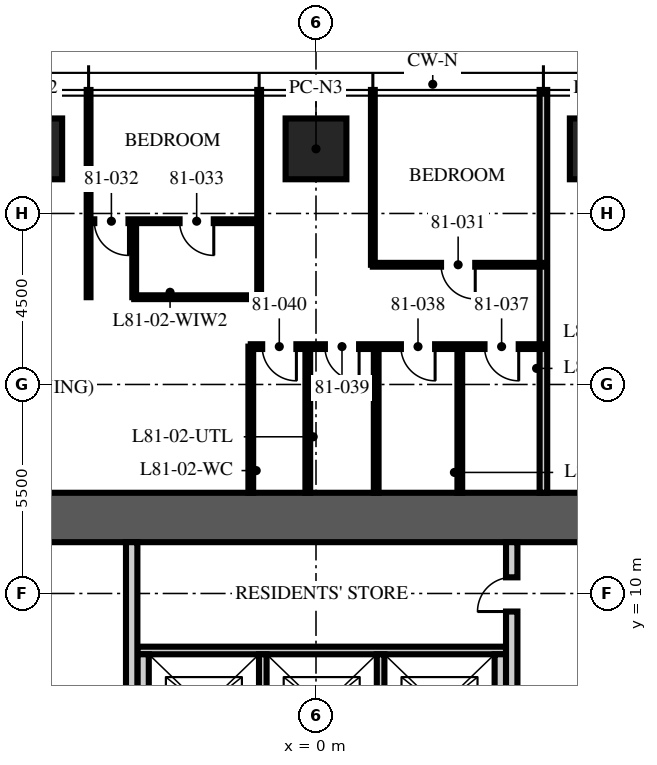
"""IFC4 building model, lengths in metres.
Left out: names, types, materials, properties, quantities, classifications, styles, units other than length and angle.
Written with IfcOpenShell. Run it as: python <this file> out.ifc"""

import sys

from ifc_helpers import new_model, si_unit, direction, frame, frame_2d, origin, origin_2d, place, context, subcontext, project, spatial, rectangle, extrude, element, fill, save


model = new_model("IFC4")
c1 = context("Model", 3, precision=1e-05, world=origin(), true_north=direction((0.0, 1.0)))
c2 = subcontext(c1, "Body", "Model", "MODEL_VIEW")
j1 = project(units=[si_unit("LENGTHUNIT", "METRE"), si_unit("PLANEANGLEUNIT", "RADIAN")], contexts=[c1])
p1 = place(None, origin())
s1 = spatial("IfcSite", under=j1, at=p1, CompositionType="ELEMENT")
p2 = place(p1, origin())
s2 = spatial("IfcBuilding", under=s1, at=p2, CompositionType="ELEMENT")
p3 = place(p2, frame((0.0, 0.0, 323.25)))
s3 = spatial("IfcBuildingStorey", under=s2, at=p3, CompositionType="ELEMENT", Elevation=323.25)
p4 = place(p3, frame((-15.5, 12.0, -0.25), z_axis=(0.0, 0.0, 1.0), x_axis=(1.0, 0.0, 0.0)))
e1 = element("IfcWall", 1, at=p4, inside=s3, PredefinedType="SHEAR", context=c2, shape_type="SweptSolid", body=[
    extrude(rectangle(XDim=31.0, YDim=1.3, at=frame_2d((15.5, 0.0))), origin(), (0.0, 0.0, 1.0), 3.75),
])
for number, where, z_axis, x_axis in (
    (2, (-7.48, 21.7, 0.0), (0.0, 0.0, 1.0), (1.0, 0.0, 0.0)),
    (3, (0.0, 21.7, 0.0), (0.0, 0.0, 1.0), (1.0, 0.0, 0.0)),
    (4, (7.48, 21.7, 0.0), (0.0, 0.0, 1.0), (1.0, 0.0, 0.0)),
):
    element("IfcColumn", number, at=place(p3, frame(where, z_axis=z_axis, x_axis=x_axis)), inside=s3, PredefinedType="COLUMN", context=c2, shape_type="SweptSolid", body=[
        extrude(rectangle(XDim=1.6, YDim=1.6, at=origin_2d()), origin(), (0.0, 0.0, 1.0), 3.75),
    ])
p5 = place(p3, frame((-4.7, 8.5, 0.0), z_axis=(0.0, 0.0, 1.0), x_axis=(1.0, 0.0, 0.0)))
e5 = element("IfcWall", 5, at=p5, inside=s3, PredefinedType="PARTITIONING", context=c2, shape_type="SweptSolid", body=[
    extrude(rectangle(XDim=9.7, YDim=0.2, at=frame_2d((4.85, 0.0))), origin(), (0.0, 0.0, 1.0), 3.5),
])
for number, where, z_axis, x_axis in (
    (6, (-4.55, 5.6, 0.0), (0.0, 0.0, 1.0), (0.0, 1.0, 0.0)),
    (7, (4.85, 5.6, 0.0), (0.0, 0.0, 1.0), (0.0, 1.0, 0.0)),
):
    element("IfcWall", number, at=place(p3, frame(where, z_axis=z_axis, x_axis=x_axis)), inside=s3, PredefinedType="PARTITIONING", context=c2, shape_type="SweptSolid", body=[
        extrude(rectangle(XDim=2.8, YDim=0.3, at=frame_2d((1.4, 0.0))), origin(), (0.0, 0.0, 1.0), 3.5),
    ])
for number, where, z_axis, x_axis in (
    (8, (-1.4, 5.6, 0.0), (0.0, 0.0, 1.0), (0.0, 1.0, 0.0)),
    (9, (1.7, 5.6, 0.0), (0.0, 0.0, 1.0), (0.0, 1.0, 0.0)),
):
    element("IfcWall", number, at=place(p3, frame(where, z_axis=z_axis, x_axis=x_axis)), inside=s3, PredefinedType="PARTITIONING", context=c2, shape_type="SweptSolid", body=[
        extrude(rectangle(XDim=2.8, YDim=0.2, at=frame_2d((1.4, 0.0))), origin(), (0.0, 0.0, 1.0), 3.5),
    ])
p6 = place(p3, frame((-4.85, 5.3, 0.0), z_axis=(0.0, 0.0, 1.0), x_axis=(0.0, 1.0, 0.0)))
e10 = element("IfcWall", 10, at=p6, inside=s3, PredefinedType="PARTITIONING", context=c2, shape_type="SweptSolid", body=[
    extrude(rectangle(XDim=6.05, YDim=0.3, at=frame_2d((3.025, 0.0))), origin(), (0.0, 0.0, 1.0), 3.5),
])
p7 = place(p3, frame((5.15, 5.3, 0.0), z_axis=(0.0, 0.0, 1.0), x_axis=(0.0, 1.0, 0.0)))
e11 = element("IfcWall", 11, at=p7, inside=s3, PredefinedType="PARTITIONING", context=c2, shape_type="SweptSolid", body=[
    extrude(rectangle(XDim=6.05, YDim=0.3, at=frame_2d((3.025, 0.0))), origin(), (0.0, 0.0, 1.0), 3.5),
])
p8 = place(p7, frame((4.225, 0.0, 0.0)))
e12 = element("IfcOpeningElement", 12, at=p8, cuts=e11, PredefinedType="OPENING", context=c2, shape_type="SweptSolid", body=[
    extrude(rectangle(XDim=0.9, YDim=2.1, at=frame_2d((0.45, 1.05))), frame((0.0, 0.16, 0.0), z_axis=(0.0, -1.0, 0.0), x_axis=(1.0, 0.0, 0.0)), (0.0, 0.0, 1.0), 0.32),
])
p9 = place(p3, frame((5.984, 12.65, 0.0), z_axis=(0.0, 0.0, 1.0), x_axis=(0.0, 1.0, 0.0)))
e13 = element("IfcWall", 13, at=p9, inside=s3, PredefinedType="PARTITIONING", context=c2, shape_type="SweptSolid", body=[
    extrude(rectangle(XDim=10.6, YDim=0.2, at=frame_2d((5.3, 0.0))), origin(), (0.0, 0.0, 1.0), 3.01),
])
p10 = place(p3, frame((1.496, 18.65, 0.0), z_axis=(0.0, 0.0, 1.0), x_axis=(0.0, 1.0, 0.0)))
e14 = element("IfcWall", 14, at=p10, inside=s3, PredefinedType="PARTITIONING", context=c2, shape_type="SweptSolid", body=[
    extrude(rectangle(XDim=4.6, YDim=0.1, at=frame_2d((2.3, 0.0))), origin(), (0.0, 0.0, 1.0), 3.01),
])
for number, where, z_axis, x_axis in (
    (15, (-1.496, 17.796, 0.0), (0.0, 0.0, 1.0), (0.0, 1.0, 0.0)),
    (16, (-5.984, 17.796, 0.0), (0.0, 0.0, 1.0), (0.0, 1.0, 0.0)),
):
    element("IfcWall", number, at=place(p3, frame(where, z_axis=z_axis, x_axis=x_axis)), inside=s3, PredefinedType="PARTITIONING", context=c2, shape_type="SweptSolid", body=[
        extrude(rectangle(XDim=5.454, YDim=0.1, at=frame_2d((2.727, 0.0))), origin(), (0.0, 0.0, 1.0), 3.01),
    ])
p11 = place(p3, frame((5.984, 18.65, 0.0), z_axis=(0.0, 0.0, 1.0), x_axis=(-1.0, 0.0, 0.0)))
e17 = element("IfcWall", 17, at=p11, inside=s3, PredefinedType="PARTITIONING", context=c2, shape_type="SweptSolid", body=[
    extrude(rectangle(XDim=4.488, YDim=0.1, at=frame_2d((2.244, 0.0))), origin(), (0.0, 0.0, 1.0), 2.91),
])
p12 = place(p11, frame((1.794, 0.0, 0.0)))
e18 = element("IfcOpeningElement", 18, at=p12, cuts=e17, PredefinedType="OPENING", context=c2, shape_type="SweptSolid", body=[
    extrude(rectangle(XDim=0.9, YDim=2.1, at=frame_2d((0.45, 1.05))), frame((0.0, 0.06, 0.0), z_axis=(0.0, -1.0, 0.0), x_axis=(1.0, 0.0, 0.0)), (0.0, 0.0, 1.0), 0.12),
])
p13 = place(p3, frame((-1.496, 19.796, 0.0), z_axis=(0.0, 0.0, 1.0), x_axis=(-1.0, 0.0, 0.0)))
e19 = element("IfcWall", 19, at=p13, inside=s3, PredefinedType="PARTITIONING", context=c2, shape_type="SweptSolid", body=[
    extrude(rectangle(XDim=4.488, YDim=0.1, at=frame_2d((2.244, 0.0))), origin(), (0.0, 0.0, 1.0), 2.91),
])
p14 = place(p13, frame((3.438, 0.0, 0.0)))
e20 = element("IfcOpeningElement", 20, at=p14, cuts=e19, PredefinedType="OPENING", context=c2, shape_type="SweptSolid", body=[
    extrude(rectangle(XDim=0.9, YDim=2.1, at=frame_2d((0.45, 1.05))), frame((0.0, 0.06, 0.0), z_axis=(0.0, -1.0, 0.0), x_axis=(1.0, 0.0, 0.0)), (0.0, 0.0, 1.0), 0.12),
])
p15 = place(p13, frame((1.194, 0.0, 0.0)))
e21 = element("IfcOpeningElement", 21, at=p15, cuts=e19, PredefinedType="OPENING", context=c2, shape_type="SweptSolid", body=[
    extrude(rectangle(XDim=0.9, YDim=2.1, at=frame_2d((0.45, 1.05))), frame((0.0, 0.06, 0.0), z_axis=(0.0, -1.0, 0.0), x_axis=(1.0, 0.0, 0.0)), (0.0, 0.0, 1.0), 0.12),
])
p16 = place(p3, frame((-4.784, 17.796, 0.0), z_axis=(0.0, 0.0, 1.0), x_axis=(0.0, 1.0, 0.0)))
e22 = element("IfcWall", 22, at=p16, inside=s3, PredefinedType="PARTITIONING", context=c2, shape_type="SweptSolid", body=[
    extrude(rectangle(XDim=2.0, YDim=0.1, at=frame_2d((1.0, 0.0))), origin(), (0.0, 0.0, 1.0), 3.5),
])
p17 = place(p3, frame((-1.496, 17.796, 0.0), z_axis=(0.0, 0.0, 1.0), x_axis=(-1.0, 0.0, 0.0)))
e23 = element("IfcWall", 23, at=p17, inside=s3, PredefinedType="PARTITIONING", context=c2, shape_type="SweptSolid", body=[
    extrude(rectangle(XDim=3.288, YDim=0.1, at=frame_2d((1.644, 0.0))), origin(), (0.0, 0.0, 1.0), 2.91),
])
p18 = place(p3, frame((5.984, 16.496, 0.0), z_axis=(0.0, 0.0, 1.0), x_axis=(-1.0, 0.0, 0.0)))
e24 = element("IfcWall", 24, at=p18, inside=s3, PredefinedType="PARTITIONING", context=c2, shape_type="SweptSolid", body=[
    extrude(rectangle(XDim=7.7, YDim=0.125, at=frame_2d((3.85, 0.0))), origin(), (0.0, 0.0, 1.0), 2.9),
])
p19 = place(p18, frame((0.65, 0.0, 0.0)))
e25 = element("IfcOpeningElement", 25, at=p19, cuts=e24, PredefinedType="OPENING", context=c2, shape_type="SweptSolid", body=[
    extrude(rectangle(XDim=0.9, YDim=2.1, at=frame_2d((0.45, 1.05))), frame((0.0, 0.073, 0.0), z_axis=(0.0, -1.0, 0.0), x_axis=(1.0, 0.0, 0.0)), (0.0, 0.0, 1.0), 0.145),
])
p20 = place(p18, frame((2.85, 0.0, 0.0)))
e26 = element("IfcOpeningElement", 26, at=p20, cuts=e24, PredefinedType="OPENING", context=c2, shape_type="SweptSolid", body=[
    extrude(rectangle(XDim=0.9, YDim=2.1, at=frame_2d((0.45, 1.05))), frame((0.0, 0.073, 0.0), z_axis=(0.0, -1.0, 0.0), x_axis=(1.0, 0.0, 0.0)), (0.0, 0.0, 1.0), 0.145),
])
p21 = place(p18, frame((4.85, 0.0, 0.0)))
e27 = element("IfcOpeningElement", 27, at=p21, cuts=e24, PredefinedType="OPENING", context=c2, shape_type="SweptSolid", body=[
    extrude(rectangle(XDim=0.9, YDim=2.1, at=frame_2d((0.45, 1.05))), frame((0.0, 0.073, 0.0), z_axis=(0.0, -1.0, 0.0), x_axis=(1.0, 0.0, 0.0)), (0.0, 0.0, 1.0), 0.145),
])
p22 = place(p18, frame((6.5, 0.0, 0.0)))
e28 = element("IfcOpeningElement", 28, at=p22, cuts=e24, PredefinedType="OPENING", context=c2, shape_type="SweptSolid", body=[
    extrude(rectangle(XDim=0.9, YDim=2.1, at=frame_2d((0.45, 1.05))), frame((0.0, 0.073, 0.0), z_axis=(0.0, -1.0, 0.0), x_axis=(1.0, 0.0, 0.0)), (0.0, 0.0, 1.0), 0.145),
])
p23 = place(p3, frame((3.784, 12.65, 0.0), z_axis=(0.0, 0.0, 1.0), x_axis=(0.0, 1.0, 0.0)))
e29 = element("IfcWall", 29, at=p23, inside=s3, PredefinedType="PARTITIONING", context=c2, shape_type="SweptSolid", body=[
    extrude(rectangle(XDim=3.846, YDim=0.125, at=frame_2d((1.923, 0.0))), origin(), (0.0, 0.0, 1.0), 2.91),
])
for number, where, z_axis, x_axis in (
    (30, (1.584, 12.65, 0.0), (0.0, 0.0, 1.0), (0.0, 1.0, 0.0)),
    (31, (-0.216, 12.65, 0.0), (0.0, 0.0, 1.0), (0.0, 1.0, 0.0)),
    (32, (-1.716, 12.65, 0.0), (0.0, 0.0, 1.0), (0.0, 1.0, 0.0)),
):
    element("IfcWall", number, at=place(p3, frame(where, z_axis=z_axis, x_axis=x_axis)), inside=s3, PredefinedType="PARTITIONING", context=c2, shape_type="SweptSolid", body=[
        extrude(rectangle(XDim=3.846, YDim=0.125, at=frame_2d((1.923, 0.0))), origin(), (0.0, 0.0, 1.0), 3.5),
    ])
p24 = place(p8, origin())
e33 = element("IfcDoor", 33, at=p24, inside=s3, OperationType="SINGLE_SWING_LEFT", PredefinedType="DOOR", context=c2, shape_type="SweptSolid", body=[
    extrude(rectangle(XDim=0.9, YDim=2.1, at=frame_2d((0.45, 1.05))), frame((0.0, 0.025, 0.0), z_axis=(0.0, -1.0, 0.0), x_axis=(1.0, 0.0, 0.0)), (0.0, 0.0, 1.0), 0.05),
])
fill(e12, e33)
p25 = place(p12, origin())
e34 = element("IfcDoor", 34, at=p25, inside=s3, OperationType="SINGLE_SWING_LEFT", PredefinedType="DOOR", context=c2, shape_type="SweptSolid", body=[
    extrude(rectangle(XDim=0.9, YDim=2.1, at=frame_2d((0.45, 1.05))), frame((0.0, 0.025, 0.0), z_axis=(0.0, -1.0, 0.0), x_axis=(1.0, 0.0, 0.0)), (0.0, 0.0, 1.0), 0.05),
])
fill(e18, e34)
p26 = place(p14, origin())
e35 = element("IfcDoor", 35, at=p26, inside=s3, OperationType="SINGLE_SWING_LEFT", PredefinedType="DOOR", context=c2, shape_type="SweptSolid", body=[
    extrude(rectangle(XDim=0.9, YDim=2.1, at=frame_2d((0.45, 1.05))), frame((0.0, 0.025, 0.0), z_axis=(0.0, -1.0, 0.0), x_axis=(1.0, 0.0, 0.0)), (0.0, 0.0, 1.0), 0.05),
])
fill(e20, e35)
p27 = place(p15, origin())
e36 = element("IfcDoor", 36, at=p27, inside=s3, OperationType="SINGLE_SWING_LEFT", PredefinedType="DOOR", context=c2, shape_type="SweptSolid", body=[
    extrude(rectangle(XDim=0.9, YDim=2.1, at=frame_2d((0.45, 1.05))), frame((0.0, 0.025, 0.0), z_axis=(0.0, -1.0, 0.0), x_axis=(1.0, 0.0, 0.0)), (0.0, 0.0, 1.0), 0.05),
])
fill(e21, e36)
p28 = place(p19, origin())
e37 = element("IfcDoor", 37, at=p28, inside=s3, OperationType="SINGLE_SWING_LEFT", PredefinedType="DOOR", context=c2, shape_type="SweptSolid", body=[
    extrude(rectangle(XDim=0.9, YDim=2.1, at=frame_2d((0.45, 1.05))), frame((0.0, 0.025, 0.0), z_axis=(0.0, -1.0, 0.0), x_axis=(1.0, 0.0, 0.0)), (0.0, 0.0, 1.0), 0.05),
])
fill(e25, e37)
p29 = place(p20, origin())
e38 = element("IfcDoor", 38, at=p29, inside=s3, OperationType="SINGLE_SWING_LEFT", PredefinedType="DOOR", context=c2, shape_type="SweptSolid", body=[
    extrude(rectangle(XDim=0.9, YDim=2.1, at=frame_2d((0.45, 1.05))), frame((0.0, 0.025, 0.0), z_axis=(0.0, -1.0, 0.0), x_axis=(1.0, 0.0, 0.0)), (0.0, 0.0, 1.0), 0.05),
])
fill(e26, e38)
p30 = place(p21, origin())
e39 = element("IfcDoor", 39, at=p30, inside=s3, OperationType="SINGLE_SWING_LEFT", PredefinedType="DOOR", context=c2, shape_type="SweptSolid", body=[
    extrude(rectangle(XDim=0.9, YDim=2.1, at=frame_2d((0.45, 1.05))), frame((0.0, 0.025, 0.0), z_axis=(0.0, -1.0, 0.0), x_axis=(1.0, 0.0, 0.0)), (0.0, 0.0, 1.0), 0.05),
])
fill(e27, e39)
p31 = place(p22, origin())
e40 = element("IfcDoor", 40, at=p31, inside=s3, OperationType="SINGLE_SWING_LEFT", PredefinedType="DOOR", context=c2, shape_type="SweptSolid", body=[
    extrude(rectangle(XDim=0.9, YDim=2.1, at=frame_2d((0.45, 1.05))), frame((0.0, 0.025, 0.0), z_axis=(0.0, -1.0, 0.0), x_axis=(1.0, 0.0, 0.0)), (0.0, 0.0, 1.0), 0.05),
])
fill(e28, e40)
save(model, sys.argv[1])
